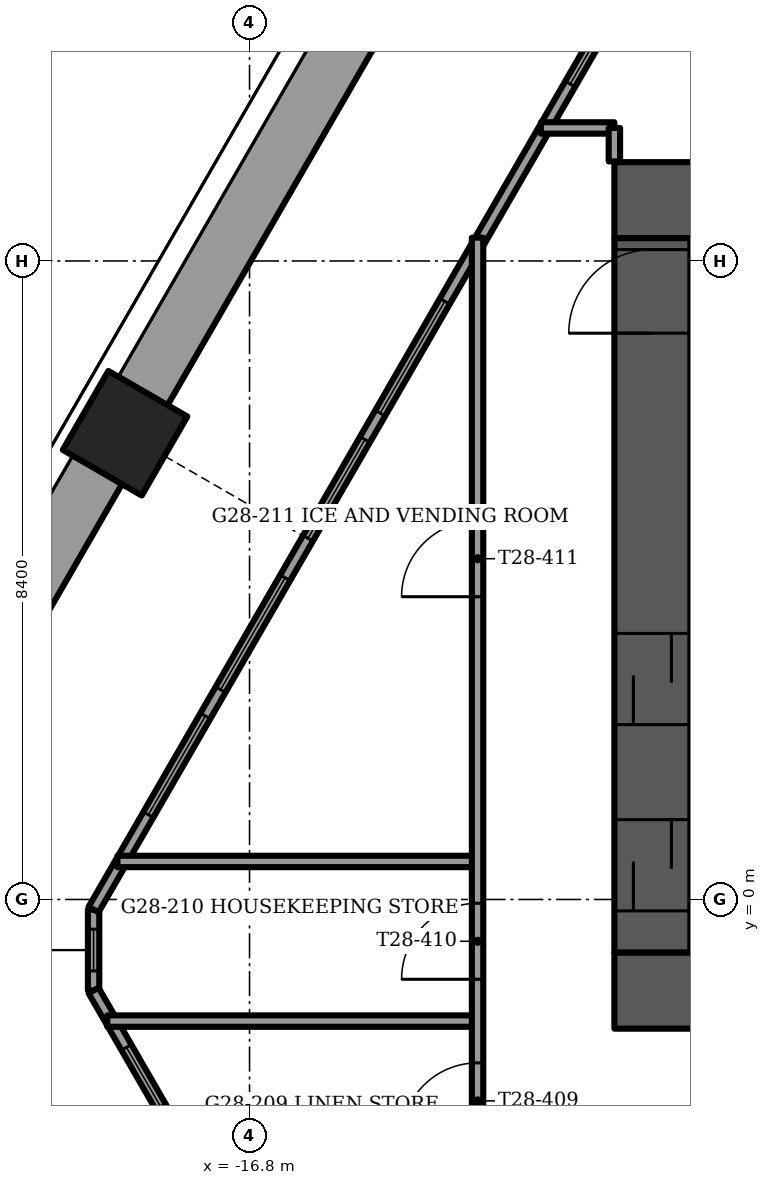
"""IFC4 building model, lengths in metres.
Left out: names, types, materials, properties, quantities, classifications, styles, units other than length and angle.
Written with IfcOpenShell. Run it as: python <this file> out.ifc"""

import sys

from ifc_helpers import new_model, si_unit, direction, frame, frame_2d, origin, origin_2d, place, context, subcontext, project, spatial, rectangle, extrude, element, fill, save


model = new_model("IFC4")
c1 = context("Model", 3, precision=1e-05, world=origin(), true_north=direction((0.0, 1.0)))
c2 = subcontext(c1, "Body", "Model", "MODEL_VIEW")
j1 = project(units=[si_unit("LENGTHUNIT", "METRE"), si_unit("PLANEANGLEUNIT", "RADIAN")], contexts=[c1])
p1 = place(None, origin())
s1 = spatial("IfcSite", under=j1, at=p1, CompositionType="ELEMENT")
p2 = place(p1, origin())
s2 = spatial("IfcBuilding", under=s1, at=p2, CompositionType="ELEMENT")
p3 = place(p2, frame((0.0, 0.0, 116.0)))
s3 = spatial("IfcBuildingStorey", under=s2, at=p3, CompositionType="ELEMENT", Elevation=116.0)
p4 = place(p3, frame((-18.438, 6.134, -1.2), z_axis=(0.0, 0.0, 1.0), x_axis=(0.5, 0.866025403784, 0.0)))
e1 = element("IfcColumn", 1, at=p4, inside=s3, PredefinedType="COLUMN", context=c2, shape_type="SweptSolid", body=[
    extrude(rectangle(XDim=1.2, YDim=1.2, at=origin_2d()), origin(), (0.0, 0.0, 1.0), 3.75),
])
p5 = place(p3, frame((-12.0, -1.2, -0.3), z_axis=(0.0, 0.0, 1.0), x_axis=(1.0, 0.0, 0.0)))
e2 = element("IfcWall", 2, at=p5, inside=s3, PredefinedType="SHEAR", context=c2, shape_type="SweptSolid", body=[
    extrude(rectangle(XDim=24.0, YDim=1.0, at=frame_2d((12.0, 0.0))), origin(), (0.0, 0.0, 1.0), 3.75),
])
p6 = place(p5, frame((11.2, 0.0, 0.0)))
e3 = element("IfcOpeningElement", 3, at=p6, cuts=e2, PredefinedType="OPENING", context=c2, shape_type="SweptSolid", body=[
    extrude(rectangle(XDim=1.6, YDim=2.1, at=frame_2d((0.8, 1.05))), frame((0.0, 0.5, 0.0), z_axis=(0.0, -1.0, 0.0), x_axis=(1.0, 0.0, 0.0)), (0.0, 0.0, 1.0), 1.0),
])
p7 = place(p3, frame((-12.0, 9.2, -0.3), z_axis=(0.0, 0.0, 1.0), x_axis=(1.0, 0.0, 0.0)))
e4 = element("IfcWall", 4, at=p7, inside=s3, PredefinedType="SHEAR", context=c2, shape_type="SweptSolid", body=[
    extrude(rectangle(XDim=24.0, YDim=1.0, at=frame_2d((12.0, 0.0))), origin(), (0.0, 0.0, 1.0), 3.75),
])
p8 = place(p7, frame((11.2, 0.0, 0.0)))
e5 = element("IfcOpeningElement", 5, at=p8, cuts=e4, PredefinedType="OPENING", context=c2, shape_type="SweptSolid", body=[
    extrude(rectangle(XDim=1.6, YDim=2.1, at=frame_2d((0.8, 1.05))), frame((0.0, 0.5, 0.0), z_axis=(0.0, -1.0, 0.0), x_axis=(1.0, 0.0, 0.0)), (0.0, 0.0, 1.0), 1.0),
])
p9 = place(p7, frame((5.25, 0.0, 0.0)))
e6 = element("IfcOpeningElement", 6, at=p9, cuts=e4, PredefinedType="OPENING", context=c2, shape_type="SweptSolid", body=[
    extrude(rectangle(XDim=1.1, YDim=2.1, at=frame_2d((0.55, 1.05))), frame((0.0, 0.5, 0.0), z_axis=(0.0, -1.0, 0.0), x_axis=(1.0, 0.0, 0.0)), (0.0, 0.0, 1.0), 1.0),
])
p10 = place(p7, frame((17.65, 0.0, 0.0)))
e7 = element("IfcOpeningElement", 7, at=p10, cuts=e4, PredefinedType="OPENING", context=c2, shape_type="SweptSolid", body=[
    extrude(rectangle(XDim=1.1, YDim=2.1, at=frame_2d((0.55, 1.05))), frame((0.0, 0.5, 0.0), z_axis=(0.0, -1.0, 0.0), x_axis=(1.0, 0.0, 0.0)), (0.0, 0.0, 1.0), 1.0),
])
p11 = place(p3, frame((-11.5, -0.7, -0.3), z_axis=(0.0, 0.0, 1.0), x_axis=(0.0, 1.0, 0.0)))
e8 = element("IfcWall", 8, at=p11, inside=s3, PredefinedType="SHEAR", context=c2, shape_type="SweptSolid", body=[
    extrude(rectangle(XDim=9.4, YDim=1.0, at=frame_2d((4.7, 0.0))), origin(), (0.0, 0.0, 1.0), 3.75),
])
p12 = place(p11, frame((8.15, 0.0, 0.0)))
e9 = element("IfcOpeningElement", 9, at=p12, cuts=e8, PredefinedType="OPENING", context=c2, shape_type="SweptSolid", body=[
    extrude(rectangle(XDim=1.1, YDim=2.1, at=frame_2d((0.55, 1.05))), frame((0.0, 0.5, 0.0), z_axis=(0.0, -1.0, 0.0), x_axis=(1.0, 0.0, 0.0)), (0.0, 0.0, 1.0), 1.0),
])
p13 = place(p11, frame((0.55, 0.0, 0.0)))
e10 = element("IfcOpeningElement", 10, at=p13, cuts=e8, PredefinedType="OPENING", context=c2, shape_type="SweptSolid", body=[
    extrude(rectangle(XDim=1.2, YDim=2.1, at=frame_2d((0.6, 1.05))), frame((0.0, 0.5, 0.0), z_axis=(0.0, -1.0, 0.0), x_axis=(1.0, 0.0, 0.0)), (0.0, 0.0, 1.0), 1.0),
])
p14 = place(p11, frame((3.0, 0.0, 0.0)))
e11 = element("IfcOpeningElement", 11, at=p14, cuts=e8, PredefinedType="OPENING", context=c2, shape_type="SweptSolid", body=[
    extrude(rectangle(XDim=1.2, YDim=2.1, at=frame_2d((0.6, 1.05))), frame((0.0, 0.5, 0.0), z_axis=(0.0, -1.0, 0.0), x_axis=(1.0, 0.0, 0.0)), (0.0, 0.0, 1.0), 1.0),
])
p15 = place(p3, frame((-14.946, 12.482, 0.0), z_axis=(0.0, 0.0, 1.0), x_axis=(-0.50001062018, -0.866019272134, 0.0)))
e12 = element("IfcWall", 12, at=p15, inside=s3, PredefinedType="PARAPET", context=c2, shape_type="SweptSolid", body=[
    extrude(rectangle(XDim=6.674, YDim=0.9, at=frame_2d((3.337, 0.0))), origin(), (0.0, 0.0, 1.0), 1.1),
])
p16 = place(p3, frame((-18.853, 5.715, 0.0), z_axis=(0.0, 0.0, 1.0), x_axis=(-0.500012951941, -0.866017925849, 0.0)))
e13 = element("IfcWall", 13, at=p16, inside=s3, PredefinedType="PARAPET", context=c2, shape_type="SweptSolid", body=[
    extrude(rectangle(XDim=6.717, YDim=0.9, at=frame_2d((3.358, 0.0))), origin(), (0.0, 0.0, 1.0), 1.1),
])
p17 = place(p3, frame((-22.211, -1.229, 0.0), z_axis=(0.0, 0.0, 1.0), x_axis=(0.49998957009, -0.866031425412, 0.0)))
e14 = element("IfcWall", 14, at=p17, inside=s3, PredefinedType="PARAPET", context=c2, shape_type="SweptSolid", body=[
    extrude(rectangle(XDim=5.564, YDim=0.9, at=frame_2d((2.782, 0.0))), origin(), (0.0, 0.0, 1.0), 1.1),
])
p18 = place(p3, frame((-7.925, 18.792, 0.0), z_axis=(0.0, 0.0, 1.0), x_axis=(-0.499994842654, -0.866028381359, 0.0)))
e15 = element("IfcWall", 15, at=p18, inside=s3, PredefinedType="SOLIDWALL", context=c2, shape_type="SweptSolid", body=[
    extrude(rectangle(XDim=21.853, YDim=0.15, at=frame_2d((10.927, 0.0))), origin(), (0.0, 0.0, 1.0), 3.45),
])
p19 = place(p18, frame((4.293, 0.0, 0.15)))
e16 = element("IfcOpeningElement", 16, at=p19, cuts=e15, PredefinedType="OPENING", context=c2, shape_type="SweptSolid", body=[
    extrude(rectangle(XDim=0.9, YDim=2.85, at=frame_2d((0.45, 1.425))), frame((0.0, 0.075, 0.0), z_axis=(0.0, -1.0, 0.0), x_axis=(1.0, 0.0, 0.0)), (0.0, 0.0, 1.0), 0.15),
])
p20 = place(p18, frame((8.412, 0.0, 0.15)))
e17 = element("IfcOpeningElement", 17, at=p20, cuts=e15, PredefinedType="OPENING", context=c2, shape_type="SweptSolid", body=[
    extrude(rectangle(XDim=0.9, YDim=2.85, at=frame_2d((0.45, 1.425))), frame((0.0, 0.075, 0.0), z_axis=(0.0, -1.0, 0.0), x_axis=(1.0, 0.0, 0.0)), (0.0, 0.0, 1.0), 0.15),
])
p21 = place(p18, frame((12.612, 0.0, 0.15)))
e18 = element("IfcOpeningElement", 18, at=p21, cuts=e15, PredefinedType="OPENING", context=c2, shape_type="SweptSolid", body=[
    extrude(rectangle(XDim=1.7, YDim=2.85, at=frame_2d((0.85, 1.425))), frame((0.0, 0.075, 0.0), z_axis=(0.0, -1.0, 0.0), x_axis=(1.0, 0.0, 0.0)), (0.0, 0.0, 1.0), 0.15),
])
p22 = place(p18, frame((14.712, 0.0, 0.15)))
e19 = element("IfcOpeningElement", 19, at=p22, cuts=e15, PredefinedType="OPENING", context=c2, shape_type="SweptSolid", body=[
    extrude(rectangle(XDim=1.5, YDim=2.85, at=frame_2d((0.75, 1.425))), frame((0.0, 0.075, 0.0), z_axis=(0.0, -1.0, 0.0), x_axis=(1.0, 0.0, 0.0)), (0.0, 0.0, 1.0), 0.15),
])
p23 = place(p18, frame((16.812, 0.0, 0.15)))
e20 = element("IfcOpeningElement", 20, at=p23, cuts=e15, PredefinedType="OPENING", context=c2, shape_type="SweptSolid", body=[
    extrude(rectangle(XDim=1.7, YDim=2.85, at=frame_2d((0.85, 1.425))), frame((0.0, 0.075, 0.0), z_axis=(0.0, -1.0, 0.0), x_axis=(1.0, 0.0, 0.0)), (0.0, 0.0, 1.0), 0.15),
])
p24 = place(p18, frame((18.912, 0.0, 0.15)))
e21 = element("IfcOpeningElement", 21, at=p24, cuts=e15, PredefinedType="OPENING", context=c2, shape_type="SweptSolid", body=[
    extrude(rectangle(XDim=1.5, YDim=2.85, at=frame_2d((0.75, 1.425))), frame((0.0, 0.075, 0.0), z_axis=(0.0, -1.0, 0.0), x_axis=(1.0, 0.0, 0.0)), (0.0, 0.0, 1.0), 0.15),
])
p25 = place(p18, frame((1.022, 0.0, 0.15)))
e22 = element("IfcOpeningElement", 22, at=p25, cuts=e15, PredefinedType="OPENING", context=c2, shape_type="SweptSolid", body=[
    extrude(rectangle(XDim=1.7, YDim=2.73, at=frame_2d((0.85, 1.365))), frame((0.0, 0.075, 0.0), z_axis=(0.0, -1.0, 0.0), x_axis=(1.0, 0.0, 0.0)), (0.0, 0.0, 1.0), 0.15),
])
p26 = place(p3, frame((-18.852, -1.198, 0.0), z_axis=(0.0, 0.0, 1.0), x_axis=(0.499992448691, -0.866029763491, 0.0)))
e23 = element("IfcWall", 23, at=p26, inside=s3, PredefinedType="SOLIDWALL", context=c2, shape_type="SweptSolid", body=[
    extrude(rectangle(XDim=16.777, YDim=0.15, at=frame_2d((8.388, 0.0))), origin(), (0.0, 0.0, 1.0), 3.45),
])
p27 = place(p26, frame((4.015, 0.0, 0.15)))
e24 = element("IfcOpeningElement", 24, at=p27, cuts=e23, PredefinedType="OPENING", context=c2, shape_type="SweptSolid", body=[
    extrude(rectangle(XDim=1.5, YDim=2.85, at=frame_2d((0.75, 1.425))), frame((0.0, 0.075, 0.0), z_axis=(0.0, -1.0, 0.0), x_axis=(1.0, 0.0, 0.0)), (0.0, 0.0, 1.0), 0.15),
])
p28 = place(p26, frame((6.588, 0.0, 0.15)))
e25 = element("IfcOpeningElement", 25, at=p28, cuts=e23, PredefinedType="OPENING", context=c2, shape_type="SweptSolid", body=[
    extrude(rectangle(XDim=1.7, YDim=2.85, at=frame_2d((0.85, 1.425))), frame((0.0, 0.075, 0.0), z_axis=(0.0, -1.0, 0.0), x_axis=(1.0, 0.0, 0.0)), (0.0, 0.0, 1.0), 0.15),
])
p29 = place(p26, frame((8.688, 0.0, 0.0)))
e26 = element("IfcOpeningElement", 26, at=p29, cuts=e23, PredefinedType="OPENING", context=c2, shape_type="SweptSolid", body=[
    extrude(rectangle(XDim=1.5, YDim=2.4, at=frame_2d((0.75, 1.2))), frame((0.0, 0.075, 0.0), z_axis=(0.0, -1.0, 0.0), x_axis=(1.0, 0.0, 0.0)), (0.0, 0.0, 1.0), 0.15),
])
p30 = place(p26, frame((10.788, 0.0, 0.15)))
e27 = element("IfcOpeningElement", 27, at=p30, cuts=e23, PredefinedType="OPENING", context=c2, shape_type="SweptSolid", body=[
    extrude(rectangle(XDim=1.7, YDim=2.85, at=frame_2d((0.85, 1.425))), frame((0.0, 0.075, 0.0), z_axis=(0.0, -1.0, 0.0), x_axis=(1.0, 0.0, 0.0)), (0.0, 0.0, 1.0), 0.15),
])
p31 = place(p26, frame((12.888, 0.0, 0.0)))
e28 = element("IfcOpeningElement", 28, at=p31, cuts=e23, PredefinedType="OPENING", context=c2, shape_type="SweptSolid", body=[
    extrude(rectangle(XDim=1.5, YDim=2.4, at=frame_2d((0.75, 1.2))), frame((0.0, 0.075, 0.0), z_axis=(0.0, -1.0, 0.0), x_axis=(1.0, 0.0, 0.0)), (0.0, 0.0, 1.0), 0.15),
])
p32 = place(p26, frame((0.863, 0.0, 0.15)))
e29 = element("IfcOpeningElement", 29, at=p32, cuts=e23, PredefinedType="OPENING", context=c2, shape_type="SweptSolid", body=[
    extrude(rectangle(XDim=0.9, YDim=2.73, at=frame_2d((0.45, 1.365))), frame((0.0, 0.075, 0.0), z_axis=(0.0, -1.0, 0.0), x_axis=(1.0, 0.0, 0.0)), (0.0, 0.0, 1.0), 0.15),
])
p33 = place(p26, frame((15.333, 0.0, 0.15)))
e30 = element("IfcOpeningElement", 30, at=p33, cuts=e23, PredefinedType="OPENING", context=c2, shape_type="SweptSolid", body=[
    extrude(rectangle(XDim=0.9, YDim=2.73, at=frame_2d((0.45, 1.365))), frame((0.0, 0.075, 0.0), z_axis=(0.0, -1.0, 0.0), x_axis=(1.0, 0.0, 0.0)), (0.0, 0.0, 1.0), 0.15),
])
p34 = place(p3, frame((-18.852, -0.133, 0.0), z_axis=(0.0, 0.0, 1.0), x_axis=(0.0, -1.0, 0.0)))
e31 = element("IfcWall", 31, at=p34, inside=s3, PredefinedType="SOLIDWALL", context=c2, shape_type="SweptSolid", body=[
    extrude(rectangle(XDim=1.065, YDim=0.15, at=frame_2d((0.532, 0.0))), origin(), (0.0, 0.0, 1.0), 3.45),
])
p35 = place(p34, frame((0.258, 0.0, 0.15)))
e32 = element("IfcOpeningElement", 32, at=p35, cuts=e31, PredefinedType="OPENING", context=c2, shape_type="SweptSolid", body=[
    extrude(rectangle(XDim=0.55, YDim=2.85, at=frame_2d((0.275, 1.425))), frame((0.0, 0.075, 0.0), z_axis=(0.0, -1.0, 0.0), x_axis=(1.0, 0.0, 0.0)), (0.0, 0.0, 1.0), 0.15),
])
p36 = place(p3, frame((-18.672, -1.6, 0.0), z_axis=(0.0, 0.0, 1.0), x_axis=(1.0, 0.0, 0.0)))
e33 = element("IfcWall", 33, at=p36, inside=s3, PredefinedType="PARTITIONING", context=c2, shape_type="SweptSolid", body=[
    extrude(rectangle(XDim=4.872, YDim=0.15, at=frame_2d((2.436, 0.0))), origin(), (0.0, 0.0, 1.0), 3.45),
])
p37 = place(p3, frame((-18.538, 0.5, 0.0), z_axis=(0.0, 0.0, 1.0), x_axis=(1.0, 0.0, 0.0)))
e34 = element("IfcWall", 34, at=p37, inside=s3, PredefinedType="PARTITIONING", context=c2, shape_type="SweptSolid", body=[
    extrude(rectangle(XDim=4.738, YDim=0.15, at=frame_2d((2.369, 0.0))), origin(), (0.0, 0.0, 1.0), 3.45),
])
p38 = place(p3, frame((-12.967, 10.15, 0.0), z_axis=(0.0, 0.0, 1.0), x_axis=(1.0, 0.0, 0.0)))
e35 = element("IfcWall", 35, at=p38, inside=s3, PredefinedType="PARTITIONING", context=c2, shape_type="SweptSolid", body=[
    extrude(rectangle(XDim=0.967, YDim=0.15, at=frame_2d((0.483, 0.0))), origin(), (0.0, 0.0, 1.0), 3.45),
])
p39 = place(p3, frame((-12.0, 9.71, 0.0), z_axis=(0.0, 0.0, 1.0), x_axis=(0.0, 1.0, 0.0)))
e36 = element("IfcWall", 36, at=p39, inside=s3, PredefinedType="PARTITIONING", context=c2, shape_type="SweptSolid", body=[
    extrude(rectangle(XDim=0.44, YDim=0.15, at=frame_2d((0.22, 0.0))), origin(), (0.0, 0.0, 1.0), 3.45),
])
p40 = place(p3, frame((-13.8, -3.7, 0.0), z_axis=(0.0, 0.0, 1.0), x_axis=(0.0, 1.0, 0.0)))
e37 = element("IfcWall", 37, at=p40, inside=s3, PredefinedType="PARTITIONING", context=c2, shape_type="SweptSolid", body=[
    extrude(rectangle(XDim=12.407, YDim=0.15, at=frame_2d((6.204, 0.0))), origin(), (0.0, 0.0, 1.0), 3.45),
])
p41 = place(p40, frame((0.55, 0.0, 0.0)))
e38 = element("IfcOpeningElement", 38, at=p41, cuts=e37, PredefinedType="OPENING", context=c2, shape_type="SweptSolid", body=[
    extrude(rectangle(XDim=1.0, YDim=2.1, at=frame_2d((0.5, 1.05))), frame((0.0, 0.075, 0.0), z_axis=(0.0, -1.0, 0.0), x_axis=(1.0, 0.0, 0.0)), (0.0, 0.0, 1.0), 0.15),
])
p42 = place(p40, frame((2.65, 0.0, 0.0)))
e39 = element("IfcOpeningElement", 39, at=p42, cuts=e37, PredefinedType="OPENING", context=c2, shape_type="SweptSolid", body=[
    extrude(rectangle(XDim=1.0, YDim=2.1, at=frame_2d((0.5, 1.05))), frame((0.0, 0.075, 0.0), z_axis=(0.0, -1.0, 0.0), x_axis=(1.0, 0.0, 0.0)), (0.0, 0.0, 1.0), 0.15),
])
p43 = place(p40, frame((7.683, 0.0, 0.0)))
e40 = element("IfcOpeningElement", 40, at=p43, cuts=e37, PredefinedType="OPENING", context=c2, shape_type="SweptSolid", body=[
    extrude(rectangle(XDim=1.0, YDim=2.1, at=frame_2d((0.5, 1.05))), frame((0.0, 0.075, 0.0), z_axis=(0.0, -1.0, 0.0), x_axis=(1.0, 0.0, 0.0)), (0.0, 0.0, 1.0), 0.15),
])
p44 = place(p20, origin())
e41 = element("IfcWindow", 41, at=p44, inside=s3, PartitioningType="SINGLE_PANEL", PredefinedType="WINDOW", context=c2, shape_type="SweptSolid", body=[
    extrude(rectangle(XDim=0.9, YDim=2.85, at=frame_2d((0.45, 1.425))), frame((0.0, 0.03, 0.0), z_axis=(0.0, -1.0, 0.0), x_axis=(1.0, 0.0, 0.0)), (0.0, 0.0, 1.0), 0.06),
])
fill(e17, e41)
p45 = place(p21, origin())
e42 = element("IfcWindow", 42, at=p45, inside=s3, PartitioningType="SINGLE_PANEL", PredefinedType="WINDOW", context=c2, shape_type="SweptSolid", body=[
    extrude(rectangle(XDim=1.7, YDim=2.85, at=frame_2d((0.85, 1.425))), frame((0.0, 0.03, 0.0), z_axis=(0.0, -1.0, 0.0), x_axis=(1.0, 0.0, 0.0)), (0.0, 0.0, 1.0), 0.06),
])
fill(e18, e42)
p46 = place(p22, origin())
e43 = element("IfcWindow", 43, at=p46, inside=s3, PartitioningType="SINGLE_PANEL", PredefinedType="WINDOW", context=c2, shape_type="SweptSolid", body=[
    extrude(rectangle(XDim=1.5, YDim=2.85, at=frame_2d((0.75, 1.425))), frame((0.0, 0.03, 0.0), z_axis=(0.0, -1.0, 0.0), x_axis=(1.0, 0.0, 0.0)), (0.0, 0.0, 1.0), 0.06),
])
fill(e19, e43)
p47 = place(p23, origin())
e44 = element("IfcWindow", 44, at=p47, inside=s3, PartitioningType="SINGLE_PANEL", PredefinedType="WINDOW", context=c2, shape_type="SweptSolid", body=[
    extrude(rectangle(XDim=1.7, YDim=2.85, at=frame_2d((0.85, 1.425))), frame((0.0, 0.03, 0.0), z_axis=(0.0, -1.0, 0.0), x_axis=(1.0, 0.0, 0.0)), (0.0, 0.0, 1.0), 0.06),
])
fill(e20, e44)
p48 = place(p24, origin())
e45 = element("IfcWindow", 45, at=p48, inside=s3, PartitioningType="SINGLE_PANEL", PredefinedType="WINDOW", context=c2, shape_type="SweptSolid", body=[
    extrude(rectangle(XDim=1.5, YDim=2.85, at=frame_2d((0.75, 1.425))), frame((0.0, 0.03, 0.0), z_axis=(0.0, -1.0, 0.0), x_axis=(1.0, 0.0, 0.0)), (0.0, 0.0, 1.0), 0.06),
])
fill(e21, e45)
p49 = place(p32, origin())
e46 = element("IfcWindow", 46, at=p49, inside=s3, PartitioningType="SINGLE_PANEL", PredefinedType="WINDOW", context=c2, shape_type="SweptSolid", body=[
    extrude(rectangle(XDim=0.9, YDim=2.73, at=frame_2d((0.45, 1.365))), frame((0.0, 0.03, 0.0), z_axis=(0.0, -1.0, 0.0), x_axis=(1.0, 0.0, 0.0)), (0.0, 0.0, 1.0), 0.06),
])
fill(e29, e46)
p50 = place(p35, origin())
e47 = element("IfcWindow", 47, at=p50, inside=s3, PartitioningType="SINGLE_PANEL", PredefinedType="WINDOW", context=c2, shape_type="SweptSolid", body=[
    extrude(rectangle(XDim=0.55, YDim=2.85, at=frame_2d((0.275, 1.425))), frame((0.0, 0.03, 0.0), z_axis=(0.0, -1.0, 0.0), x_axis=(1.0, 0.0, 0.0)), (0.0, 0.0, 1.0), 0.06),
])
fill(e32, e47)
p51 = place(p12, origin())
e48 = element("IfcDoor", 48, at=p51, inside=s3, OperationType="SINGLE_SWING_LEFT", PredefinedType="DOOR", context=c2, shape_type="SweptSolid", body=[
    extrude(rectangle(XDim=1.1, YDim=2.1, at=frame_2d((0.55, 1.05))), frame((0.0, 0.025, 0.0), z_axis=(0.0, -1.0, 0.0), x_axis=(1.0, 0.0, 0.0)), (0.0, 0.0, 1.0), 0.05),
])
fill(e9, e48)
p52 = place(p13, origin())
e49 = element("IfcDoor", 49, at=p52, inside=s3, OperationType="SLIDING_TO_LEFT", PredefinedType="DOOR", context=c2, shape_type="SweptSolid", body=[
    extrude(rectangle(XDim=1.2, YDim=2.1, at=frame_2d((0.6, 1.05))), frame((0.0, 0.025, 0.0), z_axis=(0.0, -1.0, 0.0), x_axis=(1.0, 0.0, 0.0)), (0.0, 0.0, 1.0), 0.05),
])
fill(e10, e49)
p53 = place(p14, origin())
e50 = element("IfcDoor", 50, at=p53, inside=s3, OperationType="SLIDING_TO_LEFT", PredefinedType="DOOR", context=c2, shape_type="SweptSolid", body=[
    extrude(rectangle(XDim=1.2, YDim=2.1, at=frame_2d((0.6, 1.05))), frame((0.0, 0.025, 0.0), z_axis=(0.0, -1.0, 0.0), x_axis=(1.0, 0.0, 0.0)), (0.0, 0.0, 1.0), 0.05),
])
fill(e11, e50)
p54 = place(p41, origin())
e51 = element("IfcDoor", 51, at=p54, inside=s3, OperationType="SINGLE_SWING_LEFT", PredefinedType="DOOR", context=c2, shape_type="SweptSolid", body=[
    extrude(rectangle(XDim=1.0, YDim=2.1, at=frame_2d((0.5, 1.05))), frame((0.0, 0.025, 0.0), z_axis=(0.0, -1.0, 0.0), x_axis=(1.0, 0.0, 0.0)), (0.0, 0.0, 1.0), 0.05),
])
fill(e38, e51)
p55 = place(p42, origin())
e52 = element("IfcDoor", 52, at=p55, inside=s3, OperationType="SINGLE_SWING_LEFT", PredefinedType="DOOR", context=c2, shape_type="SweptSolid", body=[
    extrude(rectangle(XDim=1.0, YDim=2.1, at=frame_2d((0.5, 1.05))), frame((0.0, 0.025, 0.0), z_axis=(0.0, -1.0, 0.0), x_axis=(1.0, 0.0, 0.0)), (0.0, 0.0, 1.0), 0.05),
])
fill(e39, e52)
p56 = place(p43, origin())
e53 = element("IfcDoor", 53, at=p56, inside=s3, OperationType="SINGLE_SWING_LEFT", PredefinedType="DOOR", context=c2, shape_type="SweptSolid", body=[
    extrude(rectangle(XDim=1.0, YDim=2.1, at=frame_2d((0.5, 1.05))), frame((0.0, 0.025, 0.0), z_axis=(0.0, -1.0, 0.0), x_axis=(1.0, 0.0, 0.0)), (0.0, 0.0, 1.0), 0.05),
])
fill(e40, e53)
save(model, sys.argv[1])
